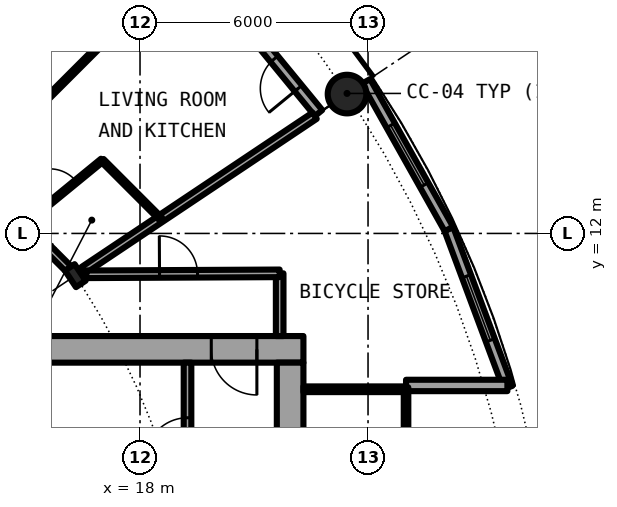
"""IFC4 building model, lengths in metres.
Left out: names, types, materials, properties, quantities, classifications, styles, units other than length and angle.
Written with IfcOpenShell. Run it as: python <this file> out.ifc"""

import sys

from ifc_helpers import new_model, si_unit, direction, frame, frame_2d, origin, origin_2d, place, context, subcontext, project, spatial, rectangle, hollow_circle, i_section, extrude, element, fill, save


model = new_model("IFC4")
c1 = context("Model", 3, precision=1e-05, world=origin(), true_north=direction((0.0, 1.0)))
c2 = subcontext(c1, "Body", "Model", "MODEL_VIEW")
j1 = project(units=[si_unit("LENGTHUNIT", "METRE"), si_unit("PLANEANGLEUNIT", "RADIAN")], contexts=[c1])
p1 = place(None, origin())
s1 = spatial("IfcSite", under=j1, at=p1, CompositionType="ELEMENT")
p2 = place(p1, origin())
s2 = spatial("IfcBuilding", under=s1, at=p2, CompositionType="ELEMENT")
p3 = place(p2, frame((0.0, 0.0, 63.6)))
s3 = spatial("IfcBuildingStorey", under=s2, at=p3, CompositionType="ELEMENT", Elevation=63.6)
p4 = place(p3, frame((23.448, 15.667, 0.0), z_axis=(0.0, 0.0, 1.0), x_axis=(1.0, 0.0, 0.0)))
e1 = element("IfcColumn", 1, at=p4, inside=s3, PredefinedType="COLUMN", context=c2, shape_type="SweptSolid", body=[
    extrude(hollow_circle(Radius=0.508, WallThickness=0.04, at=origin_2d()), origin(), (0.0, 0.0, 1.0), 3.05),
])
p5 = place(p3, frame((16.297, 10.889, 0.0), z_axis=(0.0, 0.0, 1.0), x_axis=(0.831469612303, 0.55557023302, 0.0)))
e2 = element("IfcColumn", 2, at=p5, inside=s3, PredefinedType="COLUMN", context=c2, shape_type="SweptSolid", body=[
    extrude(i_section(OverallWidth=0.306, OverallDepth=0.524, WebThickness=0.021, FlangeThickness=0.04, FilletRadius=0.027, at=origin_2d()), origin(), (0.0, 0.0, 1.0), 3.05),
])
p6 = place(p3, frame((22.699, 15.167, 0.0), z_axis=(0.0, 0.0, 1.0), x_axis=(-0.634382322723, 0.773019449054, 0.0)))
e3 = element("IfcWall", 3, at=p6, inside=s3, PredefinedType="SOLIDWALL", context=c2, shape_type="SweptSolid", body=[
    extrude(rectangle(XDim=5.352, YDim=0.25, at=frame_2d((2.676, 0.0))), origin(), (0.0, 0.0, 1.0), 2.7),
])
p7 = place(p6, frame((0.841, 0.0, 0.0)))
e4 = element("IfcOpeningElement", 4, at=p7, cuts=e3, PredefinedType="OPENING", context=c2, shape_type="SweptSolid", body=[
    extrude(rectangle(XDim=1.0, YDim=2.2, at=frame_2d((0.5, 1.1))), frame((0.0, 0.135, 0.0), z_axis=(0.0, -1.0, 0.0), x_axis=(1.0, 0.0, 0.0)), (0.0, 0.0, 1.0), 0.27),
])
p8 = place(p6, frame((3.111, 0.0, 0.3)))
e5 = element("IfcOpeningElement", 5, at=p8, cuts=e3, PredefinedType="OPENING", context=c2, shape_type="SweptSolid", body=[
    extrude(rectangle(XDim=1.8, YDim=2.1, at=frame_2d((0.9, 1.05))), frame((0.0, 0.135, 0.0), z_axis=(0.0, -1.0, 0.0), x_axis=(1.0, 0.0, 0.0)), (0.0, 0.0, 1.0), 0.27),
])
p9 = place(p3, frame((27.682, 7.945, 0.0), z_axis=(0.0, 0.0, 1.0), x_axis=(-0.349247811493, 0.937030397675, 0.0)))
e6 = element("IfcWall", 6, at=p9, inside=s3, PredefinedType="SOLIDWALL", context=c2, shape_type="SweptSolid", body=[
    extrude(rectangle(XDim=4.452, YDim=0.25, at=frame_2d((2.226, 0.0))), origin(), (0.0, 0.0, 1.0), 2.7),
])
p10 = place(p9, frame((1.327, 0.0, 0.3)))
e7 = element("IfcOpeningElement", 7, at=p10, cuts=e6, PredefinedType="OPENING", context=c2, shape_type="SweptSolid", body=[
    extrude(rectangle(XDim=1.8, YDim=2.1, at=frame_2d((0.9, 1.05))), frame((0.0, 0.135, 0.0), z_axis=(0.0, -1.0, 0.0), x_axis=(1.0, 0.0, 0.0)), (0.0, 0.0, 1.0), 0.27),
])
p11 = place(p3, frame((26.127, 12.117, 0.0), z_axis=(0.0, 0.0, 1.0), x_axis=(-0.489696356642, 0.871893042919, 0.0)))
e8 = element("IfcWall", 8, at=p11, inside=s3, PredefinedType="SOLIDWALL", context=c2, shape_type="SweptSolid", body=[
    extrude(rectangle(XDim=4.454, YDim=0.25, at=frame_2d((2.227, 0.0))), origin(), (0.0, 0.0, 1.0), 2.7),
])
p12 = place(p11, frame((1.327, 0.0, 0.3)))
e9 = element("IfcOpeningElement", 9, at=p12, cuts=e8, PredefinedType="OPENING", context=c2, shape_type="SweptSolid", body=[
    extrude(rectangle(XDim=1.8, YDim=2.1, at=frame_2d((0.9, 1.05))), frame((0.0, 0.135, 0.0), z_axis=(0.0, -1.0, 0.0), x_axis=(1.0, 0.0, 0.0)), (0.0, 0.0, 1.0), 0.27),
])
p13 = place(p3, frame((25.0, 8.0, 0.0), z_axis=(0.0, 0.0, 1.0), x_axis=(1.0, 0.0, 0.0)))
e10 = element("IfcWall", 10, at=p13, inside=s3, PredefinedType="SOLIDWALL", context=c2, shape_type="SweptSolid", body=[
    extrude(rectangle(XDim=2.667, YDim=0.3, at=frame_2d((1.333, 0.0))), origin(), (0.0, 0.0, 1.0), 2.7),
])
p14 = place(p3, frame((22.3, 8.95, 0.0), z_axis=(0.0, 0.0, 1.0), x_axis=(-1.0, 0.0, 0.0)))
e11 = element("IfcWall", 11, at=p14, inside=s3, PredefinedType="SHEAR", context=c2, shape_type="SweptSolid", body=[
    extrude(rectangle(XDim=14.0, YDim=0.7, at=frame_2d((7.0, 0.0))), origin(), (0.0, 0.0, 1.0), 3.05),
])
p15 = place(p14, frame((1.225, 0.0, 0.0)))
e12 = element("IfcOpeningElement", 12, at=p15, cuts=e11, PredefinedType="OPENING", context=c2, shape_type="SweptSolid", body=[
    extrude(rectangle(XDim=1.2, YDim=2.3, at=frame_2d((0.6, 1.15))), frame((0.0, 0.36, 0.0), z_axis=(0.0, -1.0, 0.0), x_axis=(1.0, 0.0, 0.0)), (0.0, 0.0, 1.0), 0.72),
])
p16 = place(p3, frame((21.95, 8.6, 0.0), z_axis=(0.0, 0.0, 1.0), x_axis=(0.0, -1.0, 0.0)))
e13 = element("IfcWall", 13, at=p16, inside=s3, PredefinedType="SHEAR", context=c2, shape_type="SweptSolid", body=[
    extrude(rectangle(XDim=17.2, YDim=0.7, at=frame_2d((8.6, 0.0))), origin(), (0.0, 0.0, 1.0), 3.05),
])
p17 = place(p16, frame((7.7, 0.0, 0.0)))
e14 = element("IfcOpeningElement", 14, at=p17, cuts=e13, PredefinedType="OPENING", context=c2, shape_type="SweptSolid", body=[
    extrude(rectangle(XDim=1.8, YDim=2.3, at=frame_2d((0.9, 1.15))), frame((0.0, 0.36, 0.0), z_axis=(0.0, -1.0, 0.0), x_axis=(1.0, 0.0, 0.0)), (0.0, 0.0, 1.0), 0.72),
])
p18 = place(p3, frame((19.25, 1.575, 0.0), z_axis=(0.0, 0.0, 1.0), x_axis=(0.0, 1.0, 0.0)))
e15 = element("IfcWall", 15, at=p18, inside=s3, PredefinedType="SOLIDWALL", context=c2, shape_type="SweptSolid", body=[
    extrude(rectangle(XDim=7.025, YDim=0.2, at=frame_2d((3.513, 0.0))), origin(), (0.0, 0.0, 1.0), 2.7),
])
p19 = place(p18, frame((4.475, 0.0, 0.0)))
e16 = element("IfcOpeningElement", 16, at=p19, cuts=e15, PredefinedType="OPENING", context=c2, shape_type="SweptSolid", body=[
    extrude(rectangle(XDim=1.1, YDim=2.3, at=frame_2d((0.55, 1.15))), frame((0.0, 0.11, 0.0), z_axis=(0.0, -1.0, 0.0), x_axis=(1.0, 0.0, 0.0)), (0.0, 0.0, 1.0), 0.22),
])
p20 = place(p3, frame((22.3, 7.9, 0.0), z_axis=(0.0, 0.0, 1.0), x_axis=(1.0, 0.0, 0.0)))
e17 = element("IfcWall", 17, at=p20, inside=s3, PredefinedType="PARTITIONING", context=c2, shape_type="SweptSolid", body=[
    extrude(rectangle(XDim=2.64, YDim=0.15, at=frame_2d((1.32, 0.0))), origin(), (0.0, 0.0, 1.0), 2.7),
])
p21 = place(p3, frame((25.0, 7.95, 0.0), z_axis=(0.0, 0.0, 1.0), x_axis=(0.0, -1.0, 0.0)))
e18 = element("IfcWall", 18, at=p21, inside=s3, PredefinedType="PARTITIONING", context=c2, shape_type="SweptSolid", body=[
    extrude(rectangle(XDim=15.9, YDim=0.12, at=frame_2d((7.95, 0.0))), origin(), (0.0, 0.0, 1.0), 2.7),
])
p22 = place(p21, frame((6.75, 0.0, 0.0)))
e19 = element("IfcOpeningElement", 19, at=p22, cuts=e18, PredefinedType="OPENING", context=c2, shape_type="SweptSolid", body=[
    extrude(rectangle(XDim=2.4, YDim=2.3, at=frame_2d((1.2, 1.15))), frame((0.0, 0.07, 0.0), z_axis=(0.0, -1.0, 0.0), x_axis=(1.0, 0.0, 0.0)), (0.0, 0.0, 1.0), 0.14),
])
p23 = place(p21, frame((11.55, 0.0, 0.1)))
e20 = element("IfcOpeningElement", 20, at=p23, cuts=e18, PredefinedType="OPENING", context=c2, shape_type="SweptSolid", body=[
    extrude(rectangle(XDim=3.4, YDim=2.35, at=frame_2d((1.7, 1.175))), frame((0.0, 0.07, 0.0), z_axis=(0.0, -1.0, 0.0), x_axis=(1.0, 0.0, 0.0)), (0.0, 0.0, 1.0), 0.14),
])
p24 = place(p21, frame((0.95, 0.0, 0.1)))
e21 = element("IfcOpeningElement", 21, at=p24, cuts=e18, PredefinedType="OPENING", context=c2, shape_type="SweptSolid", body=[
    extrude(rectangle(XDim=3.4, YDim=2.35, at=frame_2d((1.7, 1.175))), frame((0.0, 0.07, 0.0), z_axis=(0.0, -1.0, 0.0), x_axis=(1.0, 0.0, 0.0)), (0.0, 0.0, 1.0), 0.14),
])
p25 = place(p3, frame((21.675, 9.3, 0.0), z_axis=(0.0, 0.0, 1.0), x_axis=(0.0, 1.0, 0.0)))
e22 = element("IfcWall", 22, at=p25, inside=s3, PredefinedType="PARTITIONING", context=c2, shape_type="SweptSolid", body=[
    extrude(rectangle(XDim=1.65, YDim=0.2, at=frame_2d((0.825, 0.0))), origin(), (0.0, 0.0, 1.0), 2.7),
])
p26 = place(p3, frame((14.945, 12.241, 0.0), z_axis=(0.0, 0.0, 1.0), x_axis=(0.77367517848, 0.633582447834, 0.0)))
e23 = element("IfcWall", 23, at=p26, inside=s3, PredefinedType="PARTITIONING", context=c2, shape_type="SweptSolid", body=[
    extrude(rectangle(XDim=2.661, YDim=0.1, at=frame_2d((1.331, 0.0))), origin(), (0.0, 0.0, 1.0), 2.7),
])
p27 = place(p26, frame((0.881, 0.0, 0.0)))
e24 = element("IfcOpeningElement", 24, at=p27, cuts=e23, PredefinedType="OPENING", context=c2, shape_type="SweptSolid", body=[
    extrude(rectangle(XDim=0.9, YDim=2.3, at=frame_2d((0.45, 1.15))), frame((0.0, 0.06, 0.0), z_axis=(0.0, -1.0, 0.0), x_axis=(1.0, 0.0, 0.0)), (0.0, 0.0, 1.0), 0.12),
])
p28 = place(p3, frame((15.465, 15.465, 0.0), z_axis=(0.0, 0.0, 1.0), x_axis=(0.707106781187, 0.707106781187, 0.0)))
e25 = element("IfcWall", 25, at=p28, inside=s3, PredefinedType="PARTITIONING", context=c2, shape_type="SweptSolid", body=[
    extrude(rectangle(XDim=5.305, YDim=0.1, at=frame_2d((2.652, 0.0))), origin(), (0.0, 0.0, 1.0), 2.7),
])
p29 = place(p28, frame((2.202, 0.0, 0.0)))
e26 = element("IfcOpeningElement", 26, at=p29, cuts=e25, PredefinedType="OPENING", context=c2, shape_type="SweptSolid", body=[
    extrude(rectangle(XDim=0.9, YDim=2.3, at=frame_2d((0.45, 1.15))), frame((0.0, 0.06, 0.0), z_axis=(0.0, -1.0, 0.0), x_axis=(1.0, 0.0, 0.0)), (0.0, 0.0, 1.0), 0.12),
])
p30 = place(p3, frame((16.515, 11.034, 0.0), z_axis=(0.0, 0.0, 1.0), x_axis=(0.831382022135, 0.555701298605, 0.0)))
e27 = element("IfcWall", 27, at=p30, inside=s3, PredefinedType="PARTITIONING", context=c2, shape_type="SweptSolid", body=[
    extrude(rectangle(XDim=7.313, YDim=0.2, at=frame_2d((3.657, 0.0))), origin(), (0.0, 0.0, 1.0), 2.7),
])
p31 = place(p3, frame((16.588, 10.925, 0.0), z_axis=(0.0, 0.0, 1.0), x_axis=(0.999988019025, 0.004895079807, 0.0)))
e28 = element("IfcWall", 28, at=p31, inside=s3, PredefinedType="PARTITIONING", context=c2, shape_type="SweptSolid", body=[
    extrude(rectangle(XDim=5.087, YDim=0.2, at=frame_2d((2.543, 0.0))), origin(), (0.0, 0.0, 1.0), 2.7),
])
p32 = place(p31, frame((1.925, 0.0, 0.0)))
e29 = element("IfcOpeningElement", 29, at=p32, cuts=e28, PredefinedType="OPENING", context=c2, shape_type="SweptSolid", body=[
    extrude(rectangle(XDim=1.0, YDim=2.3, at=frame_2d((0.5, 1.15))), frame((0.0, 0.11, 0.0), z_axis=(0.0, -1.0, 0.0), x_axis=(1.0, 0.0, 0.0)), (0.0, 0.0, 1.0), 0.22),
])
p33 = place(p3, frame((11.0, 16.186, 0.0), z_axis=(0.0, 0.0, 1.0), x_axis=(0.707106781187, -0.707106781187, 0.0)))
e30 = element("IfcWall", 30, at=p33, inside=s3, PredefinedType="PARTITIONING", context=c2, shape_type="SweptSolid", body=[
    extrude(rectangle(XDim=7.334, YDim=0.2, at=frame_2d((3.667, 0.0))), origin(), (0.0, 0.0, 1.0), 2.38),
])
p34 = place(p33, frame((2.211, 0.0, 0.0)))
e31 = element("IfcOpeningElement", 31, at=p34, cuts=e30, PredefinedType="OPENING", context=c2, shape_type="SweptSolid", body=[
    extrude(rectangle(XDim=1.0, YDim=2.3, at=frame_2d((0.5, 1.15))), frame((0.0, 0.11, 0.0), z_axis=(0.0, -1.0, 0.0), x_axis=(1.0, 0.0, 0.0)), (0.0, 0.0, 1.0), 0.22),
])
p35 = place(p3, frame((17.006, 13.924, 0.0), z_axis=(0.0, 0.0, 1.0), x_axis=(0.706826194425, -0.707387256653, 0.0)))
e32 = element("IfcWall", 32, at=p35, inside=s3, PredefinedType="PARTITIONING", context=c2, shape_type="SweptSolid", body=[
    extrude(rectangle(XDim=2.176, YDim=0.1, at=frame_2d((1.088, 0.0))), origin(), (0.0, 0.0, 1.0), 2.7),
])
p36 = place(p7, origin())
e33 = element("IfcDoor", 33, at=p36, inside=s3, OperationType="SINGLE_SWING_LEFT", PredefinedType="DOOR", context=c2, shape_type="SweptSolid", body=[
    extrude(rectangle(XDim=1.0, YDim=2.2, at=frame_2d((0.5, 1.1))), frame((0.0, 0.025, 0.0), z_axis=(0.0, -1.0, 0.0), x_axis=(1.0, 0.0, 0.0)), (0.0, 0.0, 1.0), 0.05),
])
fill(e4, e33)
p37 = place(p10, origin())
e34 = element("IfcWindow", 34, at=p37, inside=s3, PartitioningType="SINGLE_PANEL", PredefinedType="WINDOW", context=c2, shape_type="SweptSolid", body=[
    extrude(rectangle(XDim=1.8, YDim=2.1, at=frame_2d((0.9, 1.05))), frame((0.0, 0.03, 0.0), z_axis=(0.0, -1.0, 0.0), x_axis=(1.0, 0.0, 0.0)), (0.0, 0.0, 1.0), 0.06),
])
fill(e7, e34)
p38 = place(p12, origin())
e35 = element("IfcWindow", 35, at=p38, inside=s3, PartitioningType="SINGLE_PANEL", PredefinedType="WINDOW", context=c2, shape_type="SweptSolid", body=[
    extrude(rectangle(XDim=1.8, YDim=2.1, at=frame_2d((0.9, 1.05))), frame((0.0, 0.03, 0.0), z_axis=(0.0, -1.0, 0.0), x_axis=(1.0, 0.0, 0.0)), (0.0, 0.0, 1.0), 0.06),
])
fill(e9, e35)
p39 = place(p19, origin())
e36 = element("IfcDoor", 36, at=p39, inside=s3, OperationType="SINGLE_SWING_LEFT", PredefinedType="DOOR", context=c2, shape_type="SweptSolid", body=[
    extrude(rectangle(XDim=1.1, YDim=2.3, at=frame_2d((0.55, 1.15))), frame((0.0, 0.025, 0.0), z_axis=(0.0, -1.0, 0.0), x_axis=(1.0, 0.0, 0.0)), (0.0, 0.0, 1.0), 0.05),
])
fill(e16, e36)
p40 = place(p15, origin())
e37 = element("IfcDoor", 37, at=p40, inside=s3, OperationType="SINGLE_SWING_RIGHT", PredefinedType="DOOR", context=c2, shape_type="SweptSolid", body=[
    extrude(rectangle(XDim=1.2, YDim=2.3, at=frame_2d((0.6, 1.15))), frame((0.0, 0.025, 0.0), z_axis=(0.0, -1.0, 0.0), x_axis=(1.0, 0.0, 0.0)), (0.0, 0.0, 1.0), 0.05),
])
fill(e12, e37)
p41 = place(p24, origin())
e38 = element("IfcWindow", 38, at=p41, inside=s3, PartitioningType="SINGLE_PANEL", PredefinedType="WINDOW", context=c2, shape_type="SweptSolid", body=[
    extrude(rectangle(XDim=3.4, YDim=2.35, at=frame_2d((1.7, 1.175))), frame((0.0, 0.03, 0.0), z_axis=(0.0, -1.0, 0.0), x_axis=(1.0, 0.0, 0.0)), (0.0, 0.0, 1.0), 0.06),
])
fill(e21, e38)
p42 = place(p27, origin())
e39 = element("IfcDoor", 39, at=p42, inside=s3, OperationType="SINGLE_SWING_LEFT", PredefinedType="DOOR", context=c2, shape_type="SweptSolid", body=[
    extrude(rectangle(XDim=0.9, YDim=2.3, at=frame_2d((0.45, 1.15))), frame((0.0, 0.025, 0.0), z_axis=(0.0, -1.0, 0.0), x_axis=(1.0, 0.0, 0.0)), (0.0, 0.0, 1.0), 0.05),
])
fill(e24, e39)
p43 = place(p32, origin())
e40 = element("IfcDoor", 40, at=p43, inside=s3, OperationType="SINGLE_SWING_LEFT", PredefinedType="DOOR", context=c2, shape_type="SweptSolid", body=[
    extrude(rectangle(XDim=1.0, YDim=2.3, at=frame_2d((0.5, 1.15))), frame((0.0, 0.025, 0.0), z_axis=(0.0, -1.0, 0.0), x_axis=(1.0, 0.0, 0.0)), (0.0, 0.0, 1.0), 0.05),
])
fill(e29, e40)
save(model, sys.argv[1])
